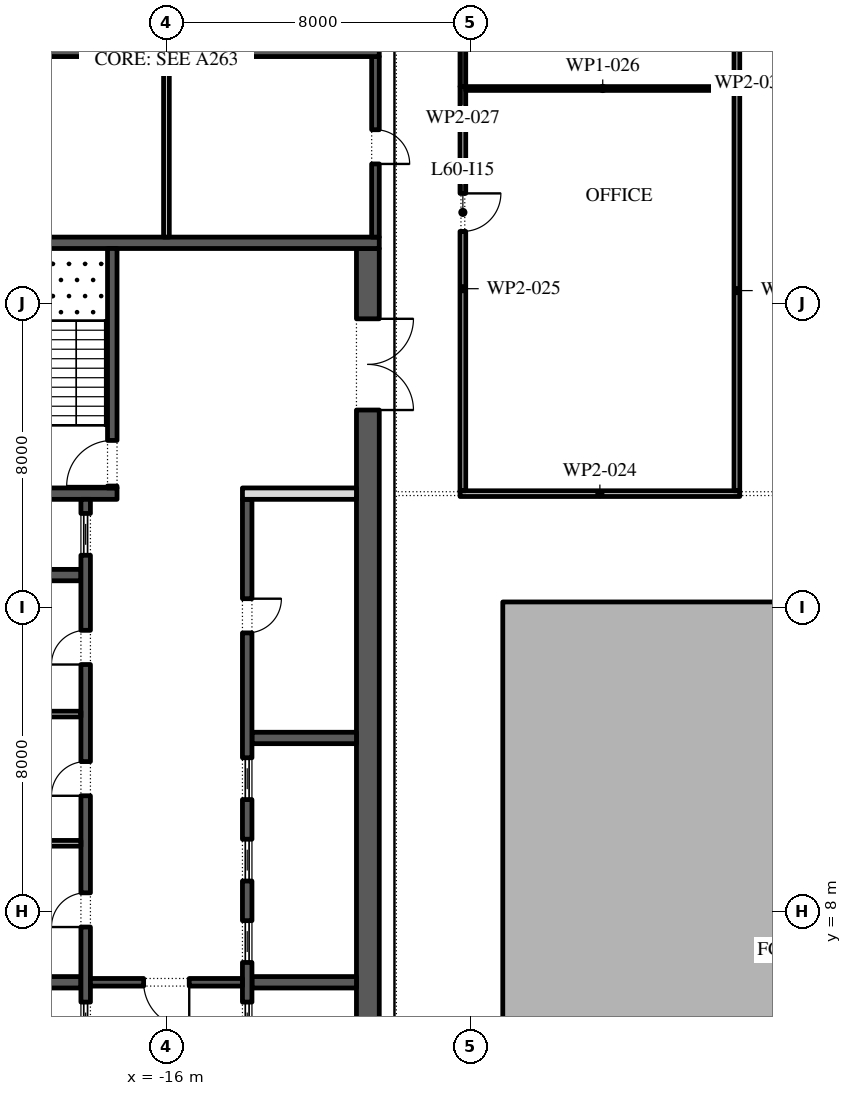
"""IFC4 building model, lengths in metres.
Left out: names, types, materials, properties, quantities, classifications, styles, units other than length and angle.
Written with IfcOpenShell. Run it as: python <this file> out.ifc"""

import sys

from ifc_helpers import new_model, si_unit, direction, frame, frame_2d, origin, place, context, subcontext, project, spatial, polyline, rectangle, outline, extrude, element, fill, save


model = new_model("IFC4")
c1 = context("Model", 3, precision=1e-05, world=origin(), true_north=direction((0.0, 1.0)))
c2 = subcontext(c1, "Body", "Model", "MODEL_VIEW")
j1 = project(units=[si_unit("LENGTHUNIT", "METRE"), si_unit("PLANEANGLEUNIT", "RADIAN")], contexts=[c1])
p1 = place(None, origin())
s1 = spatial("IfcSite", under=j1, at=p1, CompositionType="ELEMENT")
p2 = place(p1, origin())
s2 = spatial("IfcBuilding", under=s1, at=p2, CompositionType="ELEMENT")
p3 = place(p2, frame((0.0, 0.0, 276.6)))
s3 = spatial("IfcBuildingStorey", under=s2, at=p3, CompositionType="ELEMENT", Elevation=276.6)
p4 = place(p3, origin())
e1 = element("IfcWall", 1, at=p4, inside=s3, PredefinedType="STANDARD", context=c2, shape_type="SweptSolid", body=[
    extrude(outline(polyline([(-7.15, -2.15), (7.15, -2.15), (7.15, 16.15), (-7.15, 16.15), (-7.15, -2.15)]), holes=[polyline([(-7.0, -2.0), (-7.0, 16.0), (7.0, 16.0), (7.0, -2.0), (-7.0, -2.0)])]), origin(), (0.0, 0.0, 1.0), 4.0),
])
p5 = place(p3, frame((-10.7, -2.45, 0.0), z_axis=(0.0, 0.0, 1.0), x_axis=(0.0, 1.0, 0.0)))
e2 = element("IfcWall", 2, at=p5, inside=s3, PredefinedType="SHEAR", context=c2, shape_type="SweptSolid", body=[
    extrude(rectangle(XDim=27.9, YDim=0.6, at=frame_2d((13.95, 0.0))), origin(), (0.0, 0.0, 1.0), 4.0),
])
p6 = place(p5, frame((23.65, 0.0, 0.0)))
e3 = element("IfcOpeningElement", 3, at=p6, cuts=e2, PredefinedType="OPENING", context=c2, shape_type="SweptSolid", body=[
    extrude(rectangle(XDim=2.4, YDim=2.1, at=frame_2d((1.2, 1.05))), frame((0.0, 0.31, 0.0), z_axis=(0.0, -1.0, 0.0), x_axis=(1.0, 0.0, 0.0)), (0.0, 0.0, 1.0), 0.62),
])
p7 = place(p5, frame((1.387, 0.0, 0.0)))
e4 = element("IfcOpeningElement", 4, at=p7, cuts=e2, PredefinedType="OPENING", context=c2, shape_type="SweptSolid", body=[
    extrude(rectangle(XDim=0.9, YDim=2.1, at=frame_2d((0.45, 1.05))), frame((0.0, 0.31, 0.0), z_axis=(0.0, -1.0, 0.0), x_axis=(1.0, 0.0, 0.0)), (0.0, 0.0, 1.0), 0.62),
])
p8 = place(p5, frame((4.562, 0.0, 0.0)))
e5 = element("IfcOpeningElement", 5, at=p8, cuts=e2, PredefinedType="OPENING", context=c2, shape_type="SweptSolid", body=[
    extrude(rectangle(XDim=1.0, YDim=2.1, at=frame_2d((0.5, 1.05))), frame((0.0, 0.31, 0.0), z_axis=(0.0, -1.0, 0.0), x_axis=(1.0, 0.0, 0.0)), (0.0, 0.0, 1.0), 0.62),
])
p9 = place(p3, frame((-21.6, 25.6, 0.0), z_axis=(0.0, 0.0, 1.0), x_axis=(1.0, 0.0, 0.0)))
e6 = element("IfcWall", 6, at=p9, inside=s3, PredefinedType="SHEAR", context=c2, shape_type="SweptSolid", body=[
    extrude(rectangle(XDim=11.2, YDim=0.3, at=frame_2d((5.6, 0.0))), origin(), (0.0, 0.0, 1.0), 4.0),
])
p10 = place(p3, frame((-21.0, 19.0, 0.0), z_axis=(0.0, 0.0, 1.0), x_axis=(1.0, 0.0, 0.0)))
e7 = element("IfcWall", 7, at=p10, inside=s3, PredefinedType="SHEAR", context=c2, shape_type="SweptSolid", body=[
    extrude(rectangle(XDim=3.7, YDim=0.3, at=frame_2d((1.85, 0.0))), origin(), (0.0, 0.0, 1.0), 4.0),
])
p11 = place(p3, frame((-17.425, 19.15, 0.0), z_axis=(0.0, 0.0, 1.0), x_axis=(0.0, 1.0, 0.0)))
e8 = element("IfcWall", 8, at=p11, inside=s3, PredefinedType="SHEAR", context=c2, shape_type="SweptSolid", body=[
    extrude(rectangle(XDim=6.3, YDim=0.25, at=frame_2d((3.15, 0.0))), origin(), (0.0, 0.0, 1.0), 4.0),
])
p12 = place(p11, frame((0.05, 0.0, 0.0)))
e9 = element("IfcOpeningElement", 9, at=p12, cuts=e8, PredefinedType="OPENING", context=c2, shape_type="SweptSolid", body=[
    extrude(rectangle(XDim=1.2, YDim=2.1, at=frame_2d((0.6, 1.05))), frame((0.0, 0.135, 0.0), z_axis=(0.0, -1.0, 0.0), x_axis=(1.0, 0.0, 0.0)), (0.0, 0.0, 1.0), 0.27),
])
for number, where, z_axis, x_axis in (
    (10, (-21.0, 6.143, 0.0), (0.0, 0.0, 1.0), (1.0, 0.0, 0.0)),
    (11, (-21.0, 16.857, 0.0), (0.0, 0.0, 1.0), (1.0, 0.0, 0.0)),
):
    element("IfcWall", number, at=place(p3, frame(where, z_axis=z_axis, x_axis=x_axis)), inside=s3, PredefinedType="SHEAR", context=c2, shape_type="SweptSolid", body=[
        extrude(rectangle(XDim=2.75, YDim=0.3, at=frame_2d((1.375, 0.0))), origin(), (0.0, 0.0, 1.0), 4.0),
    ])
p13 = place(p3, frame((-18.125, 4.15, 0.0), z_axis=(0.0, 0.0, 1.0), x_axis=(0.0, 1.0, 0.0)))
e12 = element("IfcWall", 12, at=p13, inside=s3, PredefinedType="SHEAR", context=c2, shape_type="SweptSolid", body=[
    extrude(rectangle(XDim=14.7, YDim=0.25, at=frame_2d((7.35, 0.0))), origin(), (0.0, 0.0, 1.0), 4.0),
])
p14 = place(p13, frame((3.446, 0.0, 0.0)))
e13 = element("IfcOpeningElement", 13, at=p14, cuts=e12, PredefinedType="OPENING", context=c2, shape_type="SweptSolid", body=[
    extrude(rectangle(XDim=0.9, YDim=2.1, at=frame_2d((0.45, 1.05))), frame((0.0, 0.135, 0.0), z_axis=(0.0, -1.0, 0.0), x_axis=(1.0, 0.0, 0.0)), (0.0, 0.0, 1.0), 0.27),
])
p15 = place(p13, frame((6.9, 0.0, 0.0)))
e14 = element("IfcOpeningElement", 14, at=p15, cuts=e12, PredefinedType="OPENING", context=c2, shape_type="SweptSolid", body=[
    extrude(rectangle(XDim=0.9, YDim=2.1, at=frame_2d((0.45, 1.05))), frame((0.0, 0.135, 0.0), z_axis=(0.0, -1.0, 0.0), x_axis=(1.0, 0.0, 0.0)), (0.0, 0.0, 1.0), 0.27),
])
p16 = place(p13, frame((10.354, 0.0, 0.0)))
e15 = element("IfcOpeningElement", 15, at=p16, cuts=e12, PredefinedType="OPENING", context=c2, shape_type="SweptSolid", body=[
    extrude(rectangle(XDim=0.9, YDim=2.1, at=frame_2d((0.45, 1.05))), frame((0.0, 0.135, 0.0), z_axis=(0.0, -1.0, 0.0), x_axis=(1.0, 0.0, 0.0)), (0.0, 0.0, 1.0), 0.27),
])
p17 = place(p13, frame((0.371, 0.0, 0.0)))
e16 = element("IfcOpeningElement", 16, at=p17, cuts=e12, PredefinedType="OPENING", context=c2, shape_type="SweptSolid", body=[
    extrude(rectangle(XDim=1.1, YDim=2.1, at=frame_2d((0.55, 1.05))), frame((0.0, 0.135, 0.0), z_axis=(0.0, -1.0, 0.0), x_axis=(1.0, 0.0, 0.0)), (0.0, 0.0, 1.0), 0.27),
])
p18 = place(p13, frame((13.229, 0.0, 0.0)))
e17 = element("IfcOpeningElement", 17, at=p18, cuts=e12, PredefinedType="OPENING", context=c2, shape_type="SweptSolid", body=[
    extrude(rectangle(XDim=1.1, YDim=2.1, at=frame_2d((0.55, 1.05))), frame((0.0, 0.135, 0.0), z_axis=(0.0, -1.0, 0.0), x_axis=(1.0, 0.0, 0.0)), (0.0, 0.0, 1.0), 0.27),
])
for number, where, z_axis, x_axis in (
    (18, (-21.0, 9.8, 0.0), (0.0, 0.0, 1.0), (1.0, 0.0, 0.0)),
    (19, (-21.0, 13.2, 0.0), (0.0, 0.0, 1.0), (1.0, 0.0, 0.0)),
):
    element("IfcWall", number, at=place(p3, frame(where, z_axis=z_axis, x_axis=x_axis)), inside=s3, PredefinedType="PARTITIONING", context=c2, shape_type="SweptSolid", body=[
        extrude(rectangle(XDim=2.75, YDim=0.15, at=frame_2d((1.375, 0.0))), origin(), (0.0, 0.0, 1.0), 4.0),
    ])
for number, where, z_axis, x_axis in (
    (20, (-13.75, 6.143, 0.0), (0.0, 0.0, 1.0), (1.0, 0.0, 0.0)),
    (21, (-13.75, 12.571, 0.0), (0.0, 0.0, 1.0), (1.0, 0.0, 0.0)),
):
    element("IfcWall", number, at=place(p3, frame(where, z_axis=z_axis, x_axis=x_axis)), inside=s3, PredefinedType="SHEAR", context=c2, shape_type="SweptSolid", body=[
        extrude(rectangle(XDim=2.75, YDim=0.3, at=frame_2d((1.375, 0.0))), origin(), (0.0, 0.0, 1.0), 4.0),
    ])
p19 = place(p3, frame((-13.875, -2.45, 0.0), z_axis=(0.0, 0.0, 1.0), x_axis=(0.0, 1.0, 0.0)))
e22 = element("IfcWall", 22, at=p19, inside=s3, PredefinedType="SHEAR", context=c2, shape_type="SweptSolid", body=[
    extrude(rectangle(XDim=21.3, YDim=0.25, at=frame_2d((10.65, 0.0))), origin(), (0.0, 0.0, 1.0), 4.0),
])
p20 = place(p19, frame((17.786, 0.0, 0.0)))
e23 = element("IfcOpeningElement", 23, at=p20, cuts=e22, PredefinedType="OPENING", context=c2, shape_type="SweptSolid", body=[
    extrude(rectangle(XDim=0.9, YDim=2.1, at=frame_2d((0.45, 1.05))), frame((0.0, 0.135, 0.0), z_axis=(0.0, -1.0, 0.0), x_axis=(1.0, 0.0, 0.0)), (0.0, 0.0, 1.0), 0.27),
])
p21 = place(p19, frame((6.971, 0.0, 0.0)))
e24 = element("IfcOpeningElement", 24, at=p21, cuts=e22, PredefinedType="OPENING", context=c2, shape_type="SweptSolid", body=[
    extrude(rectangle(XDim=1.1, YDim=2.1, at=frame_2d((0.55, 1.05))), frame((0.0, 0.135, 0.0), z_axis=(0.0, -1.0, 0.0), x_axis=(1.0, 0.0, 0.0)), (0.0, 0.0, 1.0), 0.27),
])
p22 = place(p19, frame((9.114, 0.0, 0.0)))
e25 = element("IfcOpeningElement", 25, at=p22, cuts=e22, PredefinedType="OPENING", context=c2, shape_type="SweptSolid", body=[
    extrude(rectangle(XDim=1.1, YDim=2.1, at=frame_2d((0.55, 1.05))), frame((0.0, 0.135, 0.0), z_axis=(0.0, -1.0, 0.0), x_axis=(1.0, 0.0, 0.0)), (0.0, 0.0, 1.0), 0.27),
])
p23 = place(p19, frame((11.257, 0.0, 0.0)))
e26 = element("IfcOpeningElement", 26, at=p23, cuts=e22, PredefinedType="OPENING", context=c2, shape_type="SweptSolid", body=[
    extrude(rectangle(XDim=1.1, YDim=2.1, at=frame_2d((0.55, 1.05))), frame((0.0, 0.135, 0.0), z_axis=(0.0, -1.0, 0.0), x_axis=(1.0, 0.0, 0.0)), (0.0, 0.0, 1.0), 0.27),
])
p24 = place(p19, frame((13.4, 0.0, 0.0)))
e27 = element("IfcOpeningElement", 27, at=p24, cuts=e22, PredefinedType="OPENING", context=c2, shape_type="SweptSolid", body=[
    extrude(rectangle(XDim=1.1, YDim=2.1, at=frame_2d((0.55, 1.05))), frame((0.0, 0.135, 0.0), z_axis=(0.0, -1.0, 0.0), x_axis=(1.0, 0.0, 0.0)), (0.0, 0.0, 1.0), 0.27),
])
p25 = place(p3, frame((-14.0, 19.0, 0.0), z_axis=(0.0, 0.0, 1.0), x_axis=(1.0, 0.0, 0.0)))
e28 = element("IfcWall", 28, at=p25, inside=s3, PredefinedType="PARTITIONING", context=c2, shape_type="SweptSolid", body=[
    extrude(rectangle(XDim=3.0, YDim=0.3, at=frame_2d((1.5, 0.0))), origin(), (0.0, 0.0, 1.0), 4.0),
])
p26 = place(p3, frame((-18.0, 6.143, 0.0), z_axis=(0.0, 0.0, 1.0), x_axis=(1.0, 0.0, 0.0)))
e29 = element("IfcWall", 29, at=p26, inside=s3, PredefinedType="SHEAR", context=c2, shape_type="SweptSolid", body=[
    extrude(rectangle(XDim=4.0, YDim=0.2, at=frame_2d((2.0, 0.0))), origin(), (0.0, 0.0, 1.0), 4.0),
])
p27 = place(p26, frame((1.4, 0.0, 0.0)))
e30 = element("IfcOpeningElement", 30, at=p27, cuts=e29, PredefinedType="OPENING", context=c2, shape_type="SweptSolid", body=[
    extrude(rectangle(XDim=1.2, YDim=2.1, at=frame_2d((0.6, 1.05))), frame((0.0, 0.11, 0.0), z_axis=(0.0, -1.0, 0.0), x_axis=(1.0, 0.0, 0.0)), (0.0, 0.0, 1.0), 0.22),
])
p28 = place(p3, frame((-10.5, 25.75, 0.0), z_axis=(0.0, 0.0, 1.0), x_axis=(0.0, 1.0, 0.0)))
e31 = element("IfcWall", 31, at=p28, inside=s3, PredefinedType="SHEAR", context=c2, shape_type="SweptSolid", body=[
    extrude(rectangle(XDim=4.75, YDim=0.2, at=frame_2d((2.375, 0.0))), origin(), (0.0, 0.0, 1.0), 4.0),
])
p29 = place(p28, frame((1.925, 0.0, 0.0)))
e32 = element("IfcOpeningElement", 32, at=p29, cuts=e31, PredefinedType="OPENING", context=c2, shape_type="SweptSolid", body=[
    extrude(rectangle(XDim=0.9, YDim=2.1, at=frame_2d((0.45, 1.05))), frame((0.0, 0.11, 0.0), z_axis=(0.0, -1.0, 0.0), x_axis=(1.0, 0.0, 0.0)), (0.0, 0.0, 1.0), 0.22),
])
p30 = place(p3, frame((-21.6, 30.6, 0.0), z_axis=(0.0, 0.0, 1.0), x_axis=(1.0, 0.0, 0.0)))
e33 = element("IfcWall", 33, at=p30, inside=s3, PredefinedType="SHEAR", context=c2, shape_type="SweptSolid", body=[
    extrude(rectangle(XDim=11.2, YDim=0.2, at=frame_2d((5.6, 0.0))), origin(), (0.0, 0.0, 1.0), 4.0),
])
p31 = place(p3, frame((-16.0, 25.75, 0.0), z_axis=(0.0, 0.0, 1.0), x_axis=(0.0, 1.0, 0.0)))
e34 = element("IfcWall", 34, at=p31, inside=s3, PredefinedType="PARTITIONING", context=c2, shape_type="SweptSolid", body=[
    extrude(rectangle(XDim=4.75, YDim=0.15, at=frame_2d((2.375, 0.0))), origin(), (0.0, 0.0, 1.0), 4.0),
])
p32 = place(p3, frame((-8.275, 19.0, 0.0), z_axis=(0.0, 0.0, 1.0), x_axis=(1.0, 0.0, 0.0)))
e35 = element("IfcWall", 35, at=p32, inside=s3, PredefinedType="PARTITIONING", context=c2, shape_type="SweptSolid", body=[
    extrude(rectangle(XDim=7.36, YDim=0.15, at=frame_2d((3.68, 0.0))), origin(), (0.0, 0.0, 1.0), 4.0),
])
p33 = place(p3, frame((-8.2, 29.71, 0.0), z_axis=(0.0, 0.0, 1.0), x_axis=(0.0, -1.0, 0.0)))
e36 = element("IfcWall", 36, at=p33, inside=s3, PredefinedType="PARTITIONING", context=c2, shape_type="SweptSolid", body=[
    extrude(rectangle(XDim=10.635, YDim=0.15, at=frame_2d((5.317, 0.0))), origin(), (0.0, 0.0, 1.0), 4.0),
])
p34 = place(p33, frame((2.81, 0.0, 0.0)))
e37 = element("IfcOpeningElement", 37, at=p34, cuts=e36, PredefinedType="OPENING", context=c2, shape_type="SweptSolid", body=[
    extrude(rectangle(XDim=1.0, YDim=2.1, at=frame_2d((0.5, 1.05))), frame((0.0, 0.085, 0.0), z_axis=(0.0, -1.0, 0.0), x_axis=(1.0, 0.0, 0.0)), (0.0, 0.0, 1.0), 0.17),
])
p35 = place(p3, frame((-8.125, 29.66, 0.0), z_axis=(0.0, 0.0, 1.0), x_axis=(1.0, 0.0, 0.0)))
e38 = element("IfcWall", 38, at=p35, inside=s3, PredefinedType="PARTITIONING", context=c2, shape_type="SweptSolid", body=[
    extrude(rectangle(XDim=7.21, YDim=0.1, at=frame_2d((3.605, 0.0))), origin(), (0.0, 0.0, 1.0), 4.0),
])
p36 = place(p3, frame((-8.2, 32.425, 0.0), z_axis=(0.0, 0.0, 1.0), x_axis=(0.0, -1.0, 0.0)))
e39 = element("IfcWall", 39, at=p36, inside=s3, PredefinedType="PARTITIONING", context=c2, shape_type="SweptSolid", body=[
    extrude(rectangle(XDim=2.715, YDim=0.15, at=frame_2d((1.357, 0.0))), origin(), (0.0, 0.0, 1.0), 4.0),
])
p37 = place(p3, frame((-0.99, 19.075, 0.0), z_axis=(0.0, 0.0, 1.0), x_axis=(0.0, 1.0, 0.0)))
e40 = element("IfcWall", 40, at=p37, inside=s3, PredefinedType="PARTITIONING", context=c2, shape_type="SweptSolid", body=[
    extrude(rectangle(XDim=10.535, YDim=0.15, at=frame_2d((5.268, 0.0))), origin(), (0.0, 0.0, 1.0), 4.0),
])
p38 = place(p3, frame((-0.99, 29.71, 0.0), z_axis=(0.0, 0.0, 1.0), x_axis=(0.0, 1.0, 0.0)))
e41 = element("IfcWall", 41, at=p38, inside=s3, PredefinedType="PARTITIONING", context=c2, shape_type="SweptSolid", body=[
    extrude(rectangle(XDim=6.74, YDim=0.15, at=frame_2d((3.37, 0.0))), origin(), (0.0, 0.0, 1.0), 4.0),
])
p39 = place(p38, frame((3.64, 0.0, 0.0)))
e42 = element("IfcOpeningElement", 42, at=p39, cuts=e41, PredefinedType="OPENING", context=c2, shape_type="SweptSolid", body=[
    extrude(rectangle(XDim=1.0, YDim=2.1, at=frame_2d((0.5, 1.05))), frame((0.0, 0.085, 0.0), z_axis=(0.0, -1.0, 0.0), x_axis=(1.0, 0.0, 0.0)), (0.0, 0.0, 1.0), 0.17),
])
p40 = place(p14, origin())
e43 = element("IfcDoor", 43, at=p40, inside=s3, OperationType="SINGLE_SWING_RIGHT", PredefinedType="DOOR", context=c2, shape_type="SweptSolid", body=[
    extrude(rectangle(XDim=0.9, YDim=2.1, at=frame_2d((0.45, 1.05))), frame((0.0, 0.125, 0.0), z_axis=(0.0, -1.0, 0.0), x_axis=(1.0, 0.0, 0.0)), (0.0, 0.0, 1.0), 0.05),
])
fill(e13, e43)
p41 = place(p15, origin())
e44 = element("IfcDoor", 44, at=p41, inside=s3, OperationType="SINGLE_SWING_RIGHT", PredefinedType="DOOR", context=c2, shape_type="SweptSolid", body=[
    extrude(rectangle(XDim=0.9, YDim=2.1, at=frame_2d((0.45, 1.05))), frame((0.0, 0.125, 0.0), z_axis=(0.0, -1.0, 0.0), x_axis=(1.0, 0.0, 0.0)), (0.0, 0.0, 1.0), 0.05),
])
fill(e14, e44)
p42 = place(p16, origin())
e45 = element("IfcDoor", 45, at=p42, inside=s3, OperationType="SINGLE_SWING_RIGHT", PredefinedType="DOOR", context=c2, shape_type="SweptSolid", body=[
    extrude(rectangle(XDim=0.9, YDim=2.1, at=frame_2d((0.45, 1.05))), frame((0.0, 0.125, 0.0), z_axis=(0.0, -1.0, 0.0), x_axis=(1.0, 0.0, 0.0)), (0.0, 0.0, 1.0), 0.05),
])
fill(e15, e45)
p43 = place(p17, origin())
e46 = element("IfcDoor", 46, at=p43, inside=s3, OperationType="SLIDING_TO_LEFT", PredefinedType="DOOR", context=c2, shape_type="SweptSolid", body=[
    extrude(rectangle(XDim=1.1, YDim=2.1, at=frame_2d((0.55, 1.05))), frame((0.0, 0.025, 0.0), z_axis=(0.0, -1.0, 0.0), x_axis=(1.0, 0.0, 0.0)), (0.0, 0.0, 1.0), 0.05),
])
fill(e16, e46)
p44 = place(p18, origin())
e47 = element("IfcDoor", 47, at=p44, inside=s3, OperationType="SLIDING_TO_LEFT", PredefinedType="DOOR", context=c2, shape_type="SweptSolid", body=[
    extrude(rectangle(XDim=1.1, YDim=2.1, at=frame_2d((0.55, 1.05))), frame((0.0, 0.025, 0.0), z_axis=(0.0, -1.0, 0.0), x_axis=(1.0, 0.0, 0.0)), (0.0, 0.0, 1.0), 0.05),
])
fill(e17, e47)
p45 = place(p20, frame((0.9, -0.2, 0.0), z_axis=(0.0, 0.0, 1.0), x_axis=(-1.0, 0.0, 0.0)))
e48 = element("IfcDoor", 48, at=p45, inside=s3, OperationType="SINGLE_SWING_RIGHT", PredefinedType="DOOR", context=c2, shape_type="SweptSolid", body=[
    extrude(rectangle(XDim=0.9, YDim=2.1, at=frame_2d((0.45, 1.05))), frame((0.0, -0.075, 0.0), z_axis=(0.0, -1.0, 0.0), x_axis=(1.0, 0.0, 0.0)), (0.0, 0.0, 1.0), 0.05),
])
fill(e23, e48)
p46 = place(p21, origin())
e49 = element("IfcDoor", 49, at=p46, inside=s3, OperationType="SLIDING_TO_LEFT", PredefinedType="DOOR", context=c2, shape_type="SweptSolid", body=[
    extrude(rectangle(XDim=1.1, YDim=2.1, at=frame_2d((0.55, 1.05))), frame((0.0, 0.025, 0.0), z_axis=(0.0, -1.0, 0.0), x_axis=(1.0, 0.0, 0.0)), (0.0, 0.0, 1.0), 0.05),
])
fill(e24, e49)
p47 = place(p22, origin())
e50 = element("IfcDoor", 50, at=p47, inside=s3, OperationType="SLIDING_TO_LEFT", PredefinedType="DOOR", context=c2, shape_type="SweptSolid", body=[
    extrude(rectangle(XDim=1.1, YDim=2.1, at=frame_2d((0.55, 1.05))), frame((0.0, 0.025, 0.0), z_axis=(0.0, -1.0, 0.0), x_axis=(1.0, 0.0, 0.0)), (0.0, 0.0, 1.0), 0.05),
])
fill(e25, e50)
p48 = place(p23, origin())
e51 = element("IfcDoor", 51, at=p48, inside=s3, OperationType="SLIDING_TO_LEFT", PredefinedType="DOOR", context=c2, shape_type="SweptSolid", body=[
    extrude(rectangle(XDim=1.1, YDim=2.1, at=frame_2d((0.55, 1.05))), frame((0.0, 0.025, 0.0), z_axis=(0.0, -1.0, 0.0), x_axis=(1.0, 0.0, 0.0)), (0.0, 0.0, 1.0), 0.05),
])
fill(e26, e51)
p49 = place(p24, origin())
e52 = element("IfcDoor", 52, at=p49, inside=s3, OperationType="SLIDING_TO_LEFT", PredefinedType="DOOR", context=c2, shape_type="SweptSolid", body=[
    extrude(rectangle(XDim=1.1, YDim=2.1, at=frame_2d((0.55, 1.05))), frame((0.0, 0.025, 0.0), z_axis=(0.0, -1.0, 0.0), x_axis=(1.0, 0.0, 0.0)), (0.0, 0.0, 1.0), 0.05),
])
fill(e27, e52)
p50 = place(p27, frame((1.2, 0.0, 0.0), z_axis=(0.0, 0.0, 1.0), x_axis=(-1.0, 0.0, 0.0)))
e53 = element("IfcDoor", 53, at=p50, inside=s3, OperationType="SINGLE_SWING_RIGHT", PredefinedType="DOOR", context=c2, shape_type="SweptSolid", body=[
    extrude(rectangle(XDim=1.2, YDim=2.1, at=frame_2d((0.6, 1.05))), frame((0.0, 0.025, 0.0), z_axis=(0.0, -1.0, 0.0), x_axis=(1.0, 0.0, 0.0)), (0.0, 0.0, 1.0), 0.05),
])
fill(e30, e53)
p51 = place(p6, frame((2.4, 0.0, 0.0), z_axis=(0.0, 0.0, 1.0), x_axis=(-1.0, 0.0, 0.0)))
e54 = element("IfcDoor", 54, at=p51, inside=s3, OperationType="DOUBLE_DOOR_SINGLE_SWING", PredefinedType="DOOR", context=c2, shape_type="SweptSolid", body=[
    extrude(rectangle(XDim=2.4, YDim=2.1, at=frame_2d((1.2, 1.05))), frame((0.0, 0.025, 0.0), z_axis=(0.0, -1.0, 0.0), x_axis=(1.0, 0.0, 0.0)), (0.0, 0.0, 1.0), 0.05),
])
fill(e3, e54)
p52 = place(p12, origin())
e55 = element("IfcDoor", 55, at=p52, inside=s3, OperationType="SINGLE_SWING_RIGHT", PredefinedType="DOOR", context=c2, shape_type="SweptSolid", body=[
    extrude(rectangle(XDim=1.2, YDim=2.1, at=frame_2d((0.6, 1.05))), frame((0.0, 0.025, 0.0), z_axis=(0.0, -1.0, 0.0), x_axis=(1.0, 0.0, 0.0)), (0.0, 0.0, 1.0), 0.05),
])
fill(e9, e55)
p53 = place(p29, frame((0.9, 0.15, 0.0), z_axis=(0.0, 0.0, 1.0), x_axis=(-1.0, 0.0, 0.0)))
e56 = element("IfcDoor", 56, at=p53, inside=s3, OperationType="SINGLE_SWING_LEFT", PredefinedType="DOOR", context=c2, shape_type="SweptSolid", body=[
    extrude(rectangle(XDim=0.9, YDim=2.1, at=frame_2d((0.45, 1.05))), frame((0.0, 0.1, 0.0), z_axis=(0.0, -1.0, 0.0), x_axis=(1.0, 0.0, 0.0)), (0.0, 0.0, 1.0), 0.05),
])
fill(e32, e56)
p54 = place(p34, origin())
e57 = element("IfcDoor", 57, at=p54, inside=s3, OperationType="SINGLE_SWING_RIGHT", PredefinedType="DOOR", context=c2, shape_type="SweptSolid", body=[
    extrude(rectangle(XDim=1.0, YDim=2.1, at=frame_2d((0.5, 1.05))), frame((0.0, 0.025, 0.0), z_axis=(0.0, -1.0, 0.0), x_axis=(1.0, 0.0, 0.0)), (0.0, 0.0, 1.0), 0.05),
])
fill(e37, e57)
save(model, sys.argv[1])
